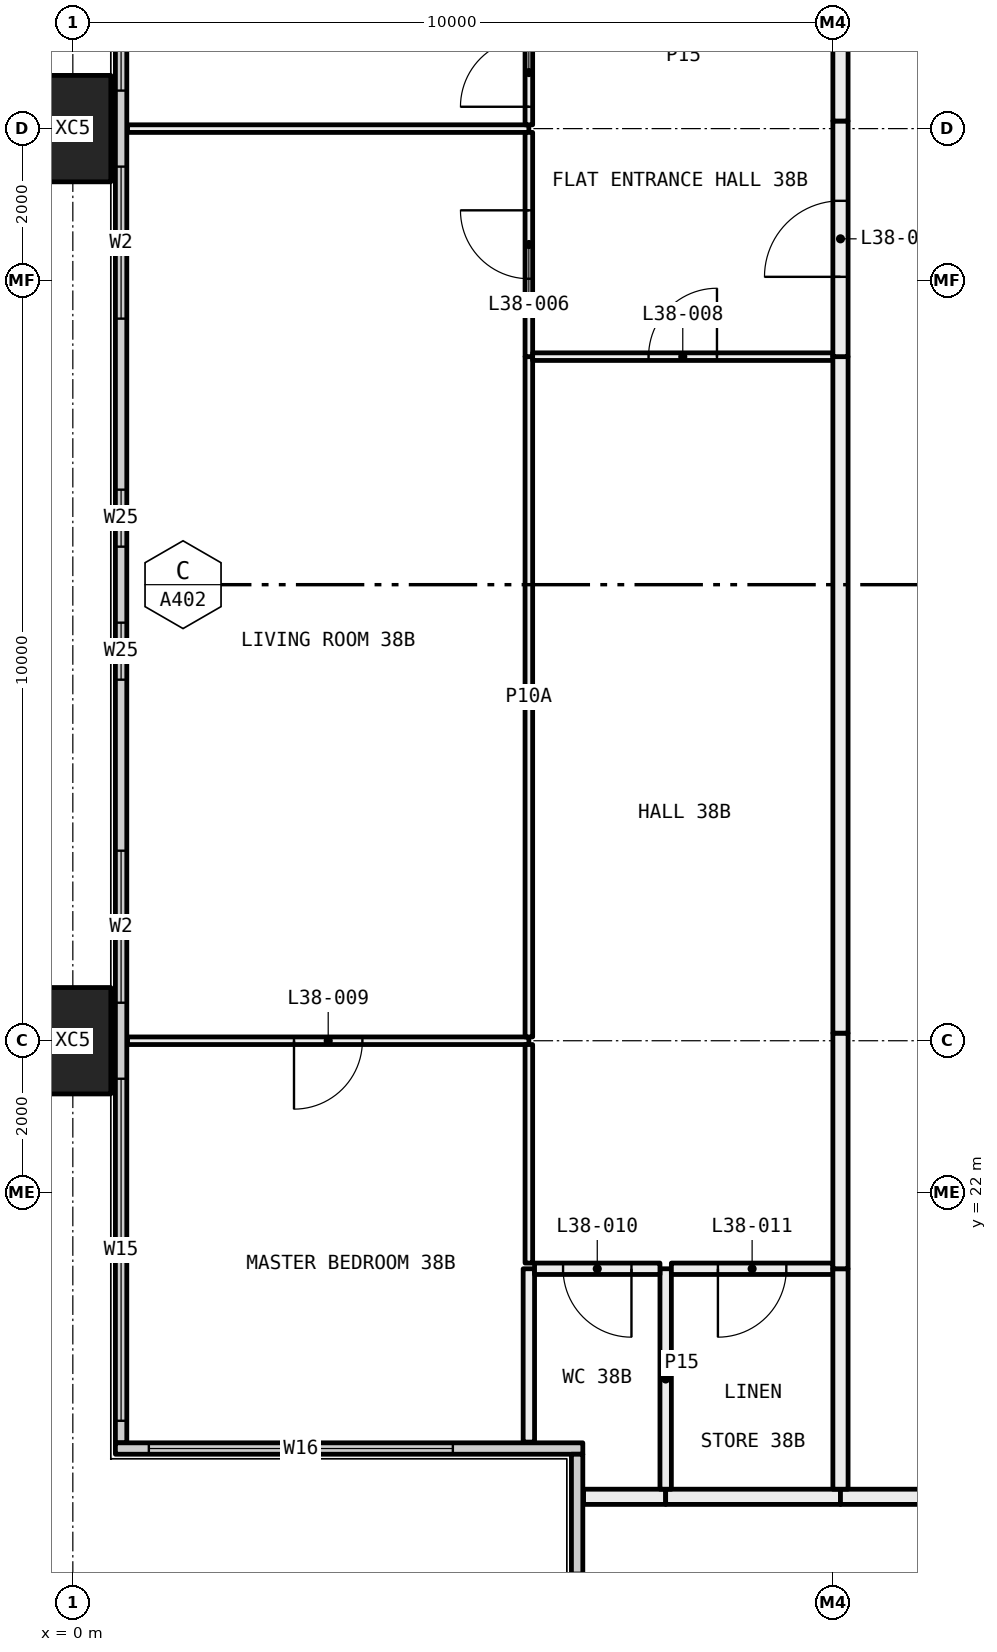
"""IFC4 building model, lengths in metres.
Left out: names, types, materials, properties, quantities, classifications, styles, units other than length and angle.
Written with IfcOpenShell. Run it as: python <this file> out.ifc"""

import sys

from ifc_helpers import new_model, si_unit, direction, frame, frame_2d, origin, origin_2d, place, context, subcontext, project, spatial, rectangle, hollow_rectangle, extrude, element, fill, save


model = new_model("IFC4")
c1 = context("Model", 3, precision=1e-05, world=origin(), true_north=direction((0.0, 1.0)))
c2 = subcontext(c1, "Body", "Model", "MODEL_VIEW")
j1 = project(units=[si_unit("LENGTHUNIT", "METRE"), si_unit("PLANEANGLEUNIT", "RADIAN")], contexts=[c1])
p1 = place(None, origin())
s1 = spatial("IfcSite", under=j1, at=p1, CompositionType="ELEMENT")
p2 = place(p1, origin())
s2 = spatial("IfcBuilding", under=s1, at=p2, CompositionType="ELEMENT")
p3 = place(p2, frame((0.0, 0.0, 144.9)))
s3 = spatial("IfcBuildingStorey", under=s2, at=p3, CompositionType="ELEMENT", Elevation=144.9)
for number, where, z_axis, x_axis in (
    (1, (0.0, 24.0, -0.4), (0.0, 0.0, 1.0), (0.0, 1.0, 0.0)),
    (2, (0.0, 36.0, -0.4), (0.0, 0.0, 1.0), (0.0, 1.0, 0.0)),
):
    element("IfcColumn", number, at=place(p3, frame(where, z_axis=z_axis, x_axis=x_axis)), inside=s3, PredefinedType="COLUMN", context=c2, shape_type="SweptSolid", body=[
        extrude(hollow_rectangle(XDim=1.4, YDim=1.0, WallThickness=0.055, at=origin_2d()), origin(), (0.0, 0.0, 1.0), 3.45),
    ])
p4 = place(p3, frame((0.635, 18.71, 0.0), z_axis=(0.0, 0.0, 1.0), x_axis=(0.0, 1.0, 0.0)))
e3 = element("IfcWall", 3, at=p4, inside=s3, PredefinedType="ELEMENTEDWALL", context=c2, shape_type="SweptSolid", body=[
    extrude(rectangle(XDim=22.58, YDim=0.15, at=frame_2d((11.29, 0.0))), origin(), (0.0, 0.0, 1.0), 3.05),
])
p5 = place(p4, frame((0.29, 0.0, 0.45)))
e4 = element("IfcOpeningElement", 4, at=p5, cuts=e3, PredefinedType="OPENING", context=c2, shape_type="SweptSolid", body=[
    extrude(rectangle(XDim=4.5, YDim=2.55, at=frame_2d((2.25, 1.275))), frame((0.0, 0.085, 0.0), z_axis=(0.0, -1.0, 0.0), x_axis=(1.0, 0.0, 0.0)), (0.0, 0.0, 1.0), 0.17),
])
p6 = place(p4, frame((5.79, 0.0, 0.45)))
e5 = element("IfcOpeningElement", 5, at=p6, cuts=e3, PredefinedType="OPENING", context=c2, shape_type="SweptSolid", body=[
    extrude(rectangle(XDim=2.0, YDim=2.55, at=frame_2d((1.0, 1.275))), frame((0.0, 0.085, 0.0), z_axis=(0.0, -1.0, 0.0), x_axis=(1.0, 0.0, 0.0)), (0.0, 0.0, 1.0), 0.17),
])
p7 = place(p4, frame((10.04, 0.0, 0.45)))
e6 = element("IfcOpeningElement", 6, at=p7, cuts=e3, PredefinedType="OPENING", context=c2, shape_type="SweptSolid", body=[
    extrude(rectangle(XDim=0.75, YDim=2.55, at=frame_2d((0.375, 1.275))), frame((0.0, 0.085, 0.0), z_axis=(0.0, -1.0, 0.0), x_axis=(1.0, 0.0, 0.0)), (0.0, 0.0, 1.0), 0.17),
])
p8 = place(p4, frame((11.79, 0.0, 0.45)))
e7 = element("IfcOpeningElement", 7, at=p8, cuts=e3, PredefinedType="OPENING", context=c2, shape_type="SweptSolid", body=[
    extrude(rectangle(XDim=0.75, YDim=2.55, at=frame_2d((0.375, 1.275))), frame((0.0, 0.085, 0.0), z_axis=(0.0, -1.0, 0.0), x_axis=(1.0, 0.0, 0.0)), (0.0, 0.0, 1.0), 0.17),
])
p9 = place(p4, frame((14.79, 0.0, 0.45)))
e8 = element("IfcOpeningElement", 8, at=p9, cuts=e3, PredefinedType="OPENING", context=c2, shape_type="SweptSolid", body=[
    extrude(rectangle(XDim=2.0, YDim=2.55, at=frame_2d((1.0, 1.275))), frame((0.0, 0.085, 0.0), z_axis=(0.0, -1.0, 0.0), x_axis=(1.0, 0.0, 0.0)), (0.0, 0.0, 1.0), 0.17),
])
p10 = place(p4, frame((17.79, 0.0, 0.45)))
e9 = element("IfcOpeningElement", 9, at=p10, cuts=e3, PredefinedType="OPENING", context=c2, shape_type="SweptSolid", body=[
    extrude(rectangle(XDim=4.5, YDim=2.55, at=frame_2d((2.25, 1.275))), frame((0.0, 0.085, 0.0), z_axis=(0.0, -1.0, 0.0), x_axis=(1.0, 0.0, 0.0)), (0.0, 0.0, 1.0), 0.17),
])
p11 = place(p3, frame((0.56, 18.635, 0.0), z_axis=(0.0, 0.0, 1.0), x_axis=(1.0, 0.0, 0.0)))
e10 = element("IfcWall", 10, at=p11, inside=s3, PredefinedType="ELEMENTEDWALL", context=c2, shape_type="SweptSolid", body=[
    extrude(rectangle(XDim=6.15, YDim=0.15, at=frame_2d((3.075, 0.0))), origin(), (0.0, 0.0, 1.0), 3.05),
])
p12 = place(p11, frame((0.44, 0.0, 0.45)))
e11 = element("IfcOpeningElement", 11, at=p12, cuts=e10, PredefinedType="OPENING", context=c2, shape_type="SweptSolid", body=[
    extrude(rectangle(XDim=4.0, YDim=2.55, at=frame_2d((2.0, 1.275))), frame((0.0, 0.085, 0.0), z_axis=(0.0, -1.0, 0.0), x_axis=(1.0, 0.0, 0.0)), (0.0, 0.0, 1.0), 0.17),
])
p13 = place(p3, frame((6.635, 12.71, 0.0), z_axis=(0.0, 0.0, 1.0), x_axis=(0.0, 1.0, 0.0)))
e12 = element("IfcWall", 12, at=p13, inside=s3, PredefinedType="ELEMENTEDWALL", context=c2, shape_type="SweptSolid", body=[
    extrude(rectangle(XDim=5.85, YDim=0.15, at=frame_2d((2.925, 0.0))), origin(), (0.0, 0.0, 1.0), 3.05),
])
p14 = place(p13, frame((0.29, 0.0, 0.45)))
e13 = element("IfcOpeningElement", 13, at=p14, cuts=e12, PredefinedType="OPENING", context=c2, shape_type="SweptSolid", body=[
    extrude(rectangle(XDim=4.0, YDim=2.55, at=frame_2d((2.0, 1.275))), frame((0.0, 0.085, 0.0), z_axis=(0.0, -1.0, 0.0), x_axis=(1.0, 0.0, 0.0)), (0.0, 0.0, 1.0), 0.17),
])
p15 = place(p3, frame((7.8, 18.0, 0.0), z_axis=(0.0, 0.0, 1.0), x_axis=(-1.0, 0.0, 0.0)))
e14 = element("IfcWall", 14, at=p15, inside=s3, PredefinedType="PARTITIONING", context=c2, shape_type="SweptSolid", body=[
    extrude(rectangle(XDim=1.08, YDim=0.2, at=frame_2d((0.54, 0.0))), origin(), (0.0, 0.0, 1.0), 3.05),
])
p16 = place(p3, frame((10.1, 18.0, 0.0), z_axis=(0.0, 0.0, 1.0), x_axis=(-1.0, 0.0, 0.0)))
e15 = element("IfcWall", 15, at=p16, inside=s3, PredefinedType="PARTITIONING", context=c2, shape_type="SweptSolid", body=[
    extrude(rectangle(XDim=2.3, YDim=0.2, at=frame_2d((1.15, 0.0))), origin(), (0.0, 0.0, 1.0), 3.05),
])
p17 = place(p3, frame((12.0, 18.0, 0.0), z_axis=(0.0, 0.0, 1.0), x_axis=(-1.0, 0.0, 0.0)))
e16 = element("IfcWall", 16, at=p17, inside=s3, PredefinedType="PARTITIONING", context=c2, shape_type="SweptSolid", body=[
    extrude(rectangle(XDim=1.9, YDim=0.2, at=frame_2d((0.95, 0.0))), origin(), (0.0, 0.0, 1.0), 3.05),
])
p18 = place(p3, frame((6.0, 24.0, 0.0), z_axis=(0.0, 0.0, 1.0), x_axis=(-1.0, 0.0, 0.0)))
e17 = element("IfcWall", 17, at=p18, inside=s3, PredefinedType="PARTITIONING", context=c2, shape_type="SweptSolid", body=[
    extrude(rectangle(XDim=5.28, YDim=0.1, at=frame_2d((2.64, 0.0))), origin(), (0.0, 0.0, 1.0), 2.45),
])
p19 = place(p18, frame((2.19, 0.0, 0.0)))
e18 = element("IfcOpeningElement", 18, at=p19, cuts=e17, PredefinedType="OPENING", context=c2, shape_type="SweptSolid", body=[
    extrude(rectangle(XDim=0.9, YDim=2.1, at=frame_2d((0.45, 1.05))), frame((0.0, 0.06, 0.0), z_axis=(0.0, -1.0, 0.0), x_axis=(1.0, 0.0, 0.0)), (0.0, 0.0, 1.0), 0.12),
])
p20 = place(p3, frame((6.0, 18.72, 0.0), z_axis=(0.0, 0.0, 1.0), x_axis=(0.0, 1.0, 0.0)))
e19 = element("IfcWall", 19, at=p20, inside=s3, PredefinedType="PARTITIONING", context=c2, shape_type="SweptSolid", body=[
    extrude(rectangle(XDim=2.28, YDim=0.15, at=frame_2d((1.14, 0.0))), origin(), (0.0, 0.0, 1.0), 3.05),
])
p21 = place(p3, frame((6.0, 21.075, 0.0), z_axis=(0.0, 0.0, 1.0), x_axis=(0.0, 1.0, 0.0)))
e20 = element("IfcWall", 20, at=p21, inside=s3, PredefinedType="PARTITIONING", context=c2, shape_type="SweptSolid", body=[
    extrude(rectangle(XDim=2.875, YDim=0.1, at=frame_2d((1.438, 0.0))), origin(), (0.0, 0.0, 1.0), 2.45),
])
p22 = place(p3, frame((6.0, 36.0, 0.0), z_axis=(0.0, 0.0, 1.0), x_axis=(-1.0, 0.0, 0.0)))
e21 = element("IfcWall", 21, at=p22, inside=s3, PredefinedType="PARTITIONING", context=c2, shape_type="SweptSolid", body=[
    extrude(rectangle(XDim=5.28, YDim=0.1, at=frame_2d((2.64, 0.0))), origin(), (0.0, 0.0, 1.0), 2.45),
])
p23 = place(p3, frame((6.0, 24.05, 0.0), z_axis=(0.0, 0.0, 1.0), x_axis=(0.0, 1.0, 0.0)))
e22 = element("IfcWall", 22, at=p23, inside=s3, PredefinedType="PARTITIONING", context=c2, shape_type="SweptSolid", body=[
    extrude(rectangle(XDim=8.95, YDim=0.1, at=frame_2d((4.475, 0.0))), origin(), (0.0, 0.0, 1.0), 2.45),
])
p24 = place(p3, frame((6.0, 33.0, 0.0), z_axis=(0.0, 0.0, 1.0), x_axis=(0.0, 1.0, 0.0)))
e23 = element("IfcWall", 23, at=p24, inside=s3, PredefinedType="PARTITIONING", context=c2, shape_type="SweptSolid", body=[
    extrude(rectangle(XDim=2.95, YDim=0.1, at=frame_2d((1.475, 0.0))), origin(), (0.0, 0.0, 1.0), 2.45),
])
p25 = place(p24, frame((1.025, 0.0, 0.0)))
e24 = element("IfcOpeningElement", 24, at=p25, cuts=e23, PredefinedType="OPENING", context=c2, shape_type="SweptSolid", body=[
    extrude(rectangle(XDim=0.9, YDim=2.1, at=frame_2d((0.45, 1.05))), frame((0.0, 0.06, 0.0), z_axis=(0.0, -1.0, 0.0), x_axis=(1.0, 0.0, 0.0)), (0.0, 0.0, 1.0), 0.12),
])
p26 = place(p3, frame((6.0, 36.05, 0.0), z_axis=(0.0, 0.0, 1.0), x_axis=(0.0, 1.0, 0.0)))
e25 = element("IfcWall", 25, at=p26, inside=s3, PredefinedType="PARTITIONING", context=c2, shape_type="SweptSolid", body=[
    extrude(rectangle(XDim=1.375, YDim=0.1, at=frame_2d((0.688, 0.0))), origin(), (0.0, 0.0, 1.0), 2.45),
])
p27 = place(p26, frame((0.238, 0.0, 0.0)))
e26 = element("IfcOpeningElement", 26, at=p27, cuts=e25, PredefinedType="OPENING", context=c2, shape_type="SweptSolid", body=[
    extrude(rectangle(XDim=0.9, YDim=2.1, at=frame_2d((0.45, 1.05))), frame((0.0, 0.06, 0.0), z_axis=(0.0, -1.0, 0.0), x_axis=(1.0, 0.0, 0.0)), (0.0, 0.0, 1.0), 0.12),
])
p28 = place(p3, frame((7.8, 18.1, 0.0), z_axis=(0.0, 0.0, 1.0), x_axis=(0.0, 1.0, 0.0)))
e27 = element("IfcWall", 27, at=p28, inside=s3, PredefinedType="PARTITIONING", context=c2, shape_type="SweptSolid", body=[
    extrude(rectangle(XDim=2.9, YDim=0.15, at=frame_2d((1.45, 0.0))), origin(), (0.0, 0.0, 1.0), 3.05),
])
p29 = place(p3, frame((7.725, 21.0, 0.0), z_axis=(0.0, 0.0, 1.0), x_axis=(-1.0, 0.0, 0.0)))
e28 = element("IfcWall", 28, at=p29, inside=s3, PredefinedType="PARTITIONING", context=c2, shape_type="SweptSolid", body=[
    extrude(rectangle(XDim=1.65, YDim=0.15, at=frame_2d((0.825, 0.0))), origin(), (0.0, 0.0, 1.0), 3.05),
])
p30 = place(p29, frame((0.375, 0.0, 0.0)))
e29 = element("IfcOpeningElement", 29, at=p30, cuts=e28, PredefinedType="OPENING", context=c2, shape_type="SweptSolid", body=[
    extrude(rectangle(XDim=0.9, YDim=2.1, at=frame_2d((0.45, 1.05))), frame((0.0, 0.085, 0.0), z_axis=(0.0, -1.0, 0.0), x_axis=(1.0, 0.0, 0.0)), (0.0, 0.0, 1.0), 0.17),
])
p31 = place(p3, frame((10.0, 21.0, 0.0), z_axis=(0.0, 0.0, 1.0), x_axis=(-1.0, 0.0, 0.0)))
e30 = element("IfcWall", 30, at=p31, inside=s3, PredefinedType="PARTITIONING", context=c2, shape_type="SweptSolid", body=[
    extrude(rectangle(XDim=2.125, YDim=0.15, at=frame_2d((1.062, 0.0))), origin(), (0.0, 0.0, 1.0), 3.05),
])
p32 = place(p31, frame((0.613, 0.0, 0.0)))
e31 = element("IfcOpeningElement", 31, at=p32, cuts=e30, PredefinedType="OPENING", context=c2, shape_type="SweptSolid", body=[
    extrude(rectangle(XDim=0.9, YDim=2.1, at=frame_2d((0.45, 1.05))), frame((0.0, 0.085, 0.0), z_axis=(0.0, -1.0, 0.0), x_axis=(1.0, 0.0, 0.0)), (0.0, 0.0, 1.0), 0.17),
])
p33 = place(p3, frame((10.1, 18.1, 0.0), z_axis=(0.0, 0.0, 1.0), x_axis=(0.0, 1.0, 0.0)))
e32 = element("IfcWall", 32, at=p33, inside=s3, PredefinedType="PARTITIONING", context=c2, shape_type="SweptSolid", body=[
    extrude(rectangle(XDim=2.9, YDim=0.2, at=frame_2d((1.45, 0.0))), origin(), (0.0, 0.0, 1.0), 3.05),
])
p34 = place(p3, frame((10.0, 33.0, 0.0), z_axis=(0.0, 0.0, 1.0), x_axis=(-1.0, 0.0, 0.0)))
e33 = element("IfcWall", 33, at=p34, inside=s3, PredefinedType="PARTITIONING", context=c2, shape_type="SweptSolid", body=[
    extrude(rectangle(XDim=3.95, YDim=0.1, at=frame_2d((1.975, 0.0))), origin(), (0.0, 0.0, 1.0), 3.05),
])
p35 = place(p34, frame((1.525, 0.0, 0.0)))
e34 = element("IfcOpeningElement", 34, at=p35, cuts=e33, PredefinedType="OPENING", context=c2, shape_type="SweptSolid", body=[
    extrude(rectangle(XDim=0.9, YDim=2.1, at=frame_2d((0.45, 1.05))), frame((0.0, 0.06, 0.0), z_axis=(0.0, -1.0, 0.0), x_axis=(1.0, 0.0, 0.0)), (0.0, 0.0, 1.0), 0.12),
])
p36 = place(p3, frame((10.1, 21.0, 0.0), z_axis=(0.0, 0.0, 1.0), x_axis=(0.0, 1.0, 0.0)))
e35 = element("IfcWall", 35, at=p36, inside=s3, PredefinedType="PARTITIONING", context=c2, shape_type="SweptSolid", body=[
    extrude(rectangle(XDim=3.1, YDim=0.2, at=frame_2d((1.55, 0.0))), origin(), (0.0, 0.0, 1.0), 2.45),
])
p37 = place(p3, frame((10.1, 24.1, 0.0), z_axis=(0.0, 0.0, 1.0), x_axis=(0.0, 1.0, 0.0)))
e36 = element("IfcWall", 36, at=p37, inside=s3, PredefinedType="PARTITIONING", context=c2, shape_type="SweptSolid", body=[
    extrude(rectangle(XDim=8.9, YDim=0.2, at=frame_2d((4.45, 0.0))), origin(), (0.0, 0.0, 1.0), 3.05),
])
p38 = place(p3, frame((10.1, 33.0, 0.0), z_axis=(0.0, 0.0, 1.0), x_axis=(0.0, 1.0, 0.0)))
e37 = element("IfcWall", 37, at=p38, inside=s3, PredefinedType="PARTITIONING", context=c2, shape_type="SweptSolid", body=[
    extrude(rectangle(XDim=3.1, YDim=0.2, at=frame_2d((1.55, 0.0))), origin(), (0.0, 0.0, 1.0), 2.45),
])
p39 = place(p38, frame((1.05, 0.0, 0.0)))
e38 = element("IfcOpeningElement", 38, at=p39, cuts=e37, PredefinedType="OPENING", context=c2, shape_type="SweptSolid", body=[
    extrude(rectangle(XDim=1.0, YDim=2.1, at=frame_2d((0.5, 1.05))), frame((0.0, 0.11, 0.0), z_axis=(0.0, -1.0, 0.0), x_axis=(1.0, 0.0, 0.0)), (0.0, 0.0, 1.0), 0.22),
])
p40 = place(p3, frame((10.1, 36.1, 0.0), z_axis=(0.0, 0.0, 1.0), x_axis=(0.0, 1.0, 0.0)))
e39 = element("IfcWall", 39, at=p40, inside=s3, PredefinedType="PARTITIONING", context=c2, shape_type="SweptSolid", body=[
    extrude(rectangle(XDim=1.4, YDim=0.2, at=frame_2d((0.7, 0.0))), origin(), (0.0, 0.0, 1.0), 3.05),
])
p41 = place(p5, origin())
e40 = element("IfcWindow", 40, at=p41, inside=s3, PartitioningType="SINGLE_PANEL", PredefinedType="WINDOW", context=c2, shape_type="SweptSolid", body=[
    extrude(rectangle(XDim=4.5, YDim=2.55, at=frame_2d((2.25, 1.275))), frame((0.0, 0.03, 0.0), z_axis=(0.0, -1.0, 0.0), x_axis=(1.0, 0.0, 0.0)), (0.0, 0.0, 1.0), 0.06),
])
fill(e4, e40)
p42 = place(p6, origin())
e41 = element("IfcWindow", 41, at=p42, inside=s3, PartitioningType="SINGLE_PANEL", PredefinedType="WINDOW", context=c2, shape_type="SweptSolid", body=[
    extrude(rectangle(XDim=2.0, YDim=2.55, at=frame_2d((1.0, 1.275))), frame((0.0, 0.03, 0.0), z_axis=(0.0, -1.0, 0.0), x_axis=(1.0, 0.0, 0.0)), (0.0, 0.0, 1.0), 0.06),
])
fill(e5, e41)
p43 = place(p7, origin())
e42 = element("IfcWindow", 42, at=p43, inside=s3, PartitioningType="SINGLE_PANEL", PredefinedType="WINDOW", context=c2, shape_type="SweptSolid", body=[
    extrude(rectangle(XDim=0.75, YDim=2.55, at=frame_2d((0.375, 1.275))), frame((0.0, 0.03, 0.0), z_axis=(0.0, -1.0, 0.0), x_axis=(1.0, 0.0, 0.0)), (0.0, 0.0, 1.0), 0.06),
])
fill(e6, e42)
p44 = place(p8, origin())
e43 = element("IfcWindow", 43, at=p44, inside=s3, PartitioningType="SINGLE_PANEL", PredefinedType="WINDOW", context=c2, shape_type="SweptSolid", body=[
    extrude(rectangle(XDim=0.75, YDim=2.55, at=frame_2d((0.375, 1.275))), frame((0.0, 0.03, 0.0), z_axis=(0.0, -1.0, 0.0), x_axis=(1.0, 0.0, 0.0)), (0.0, 0.0, 1.0), 0.06),
])
fill(e7, e43)
p45 = place(p9, origin())
e44 = element("IfcWindow", 44, at=p45, inside=s3, PartitioningType="SINGLE_PANEL", PredefinedType="WINDOW", context=c2, shape_type="SweptSolid", body=[
    extrude(rectangle(XDim=2.0, YDim=2.55, at=frame_2d((1.0, 1.275))), frame((0.0, 0.03, 0.0), z_axis=(0.0, -1.0, 0.0), x_axis=(1.0, 0.0, 0.0)), (0.0, 0.0, 1.0), 0.06),
])
fill(e8, e44)
p46 = place(p10, origin())
e45 = element("IfcWindow", 45, at=p46, inside=s3, PartitioningType="SINGLE_PANEL", PredefinedType="WINDOW", context=c2, shape_type="SweptSolid", body=[
    extrude(rectangle(XDim=4.5, YDim=2.55, at=frame_2d((2.25, 1.275))), frame((0.0, 0.03, 0.0), z_axis=(0.0, -1.0, 0.0), x_axis=(1.0, 0.0, 0.0)), (0.0, 0.0, 1.0), 0.06),
])
fill(e9, e45)
p47 = place(p12, origin())
e46 = element("IfcWindow", 46, at=p47, inside=s3, PartitioningType="SINGLE_PANEL", PredefinedType="WINDOW", context=c2, shape_type="SweptSolid", body=[
    extrude(rectangle(XDim=4.0, YDim=2.55, at=frame_2d((2.0, 1.275))), frame((0.0, 0.03, 0.0), z_axis=(0.0, -1.0, 0.0), x_axis=(1.0, 0.0, 0.0)), (0.0, 0.0, 1.0), 0.06),
])
fill(e11, e46)
p48 = place(p39, origin())
e47 = element("IfcDoor", 47, at=p48, inside=s3, OperationType="SINGLE_SWING_RIGHT", PredefinedType="DOOR", context=c2, shape_type="SweptSolid", body=[
    extrude(rectangle(XDim=1.0, YDim=2.1, at=frame_2d((0.5, 1.05))), frame((0.0, 0.025, 0.0), z_axis=(0.0, -1.0, 0.0), x_axis=(1.0, 0.0, 0.0)), (0.0, 0.0, 1.0), 0.05),
])
fill(e38, e47)
p49 = place(p25, origin())
e48 = element("IfcDoor", 48, at=p49, inside=s3, OperationType="SINGLE_SWING_LEFT", PredefinedType="DOOR", context=c2, shape_type="SweptSolid", body=[
    extrude(rectangle(XDim=0.9, YDim=2.1, at=frame_2d((0.45, 1.05))), frame((0.0, 0.025, 0.0), z_axis=(0.0, -1.0, 0.0), x_axis=(1.0, 0.0, 0.0)), (0.0, 0.0, 1.0), 0.05),
])
fill(e24, e48)
p50 = place(p27, origin())
e49 = element("IfcDoor", 49, at=p50, inside=s3, OperationType="SINGLE_SWING_RIGHT", PredefinedType="DOOR", context=c2, shape_type="SweptSolid", body=[
    extrude(rectangle(XDim=0.9, YDim=2.1, at=frame_2d((0.45, 1.05))), frame((0.0, 0.025, 0.0), z_axis=(0.0, -1.0, 0.0), x_axis=(1.0, 0.0, 0.0)), (0.0, 0.0, 1.0), 0.05),
])
fill(e26, e49)
p51 = place(p35, frame((0.9, 0.0, 0.0), x_axis=(-1.0, 0.0, 0.0)))
e50 = element("IfcDoor", 50, at=p51, inside=s3, OperationType="SINGLE_SWING_LEFT", PredefinedType="DOOR", context=c2, shape_type="SweptSolid", body=[
    extrude(rectangle(XDim=0.9, YDim=2.1, at=frame_2d((0.45, 1.05))), frame((0.0, 0.025, 0.0), z_axis=(0.0, -1.0, 0.0), x_axis=(1.0, 0.0, 0.0)), (0.0, 0.0, 1.0), 0.05),
])
fill(e34, e50)
p52 = place(p19, origin())
e51 = element("IfcDoor", 51, at=p52, inside=s3, OperationType="SINGLE_SWING_LEFT", PredefinedType="DOOR", context=c2, shape_type="SweptSolid", body=[
    extrude(rectangle(XDim=0.9, YDim=2.1, at=frame_2d((0.45, 1.05))), frame((0.0, 0.025, 0.0), z_axis=(0.0, -1.0, 0.0), x_axis=(1.0, 0.0, 0.0)), (0.0, 0.0, 1.0), 0.05),
])
fill(e18, e51)
p53 = place(p30, origin())
e52 = element("IfcDoor", 52, at=p53, inside=s3, OperationType="SINGLE_SWING_RIGHT", PredefinedType="DOOR", context=c2, shape_type="SweptSolid", body=[
    extrude(rectangle(XDim=0.9, YDim=2.1, at=frame_2d((0.45, 1.05))), frame((0.0, 0.025, 0.0), z_axis=(0.0, -1.0, 0.0), x_axis=(1.0, 0.0, 0.0)), (0.0, 0.0, 1.0), 0.05),
])
fill(e29, e52)
p54 = place(p32, origin())
e53 = element("IfcDoor", 53, at=p54, inside=s3, OperationType="SINGLE_SWING_LEFT", PredefinedType="DOOR", context=c2, shape_type="SweptSolid", body=[
    extrude(rectangle(XDim=0.9, YDim=2.1, at=frame_2d((0.45, 1.05))), frame((0.0, 0.025, 0.0), z_axis=(0.0, -1.0, 0.0), x_axis=(1.0, 0.0, 0.0)), (0.0, 0.0, 1.0), 0.05),
])
fill(e31, e53)
save(model, sys.argv[1])
